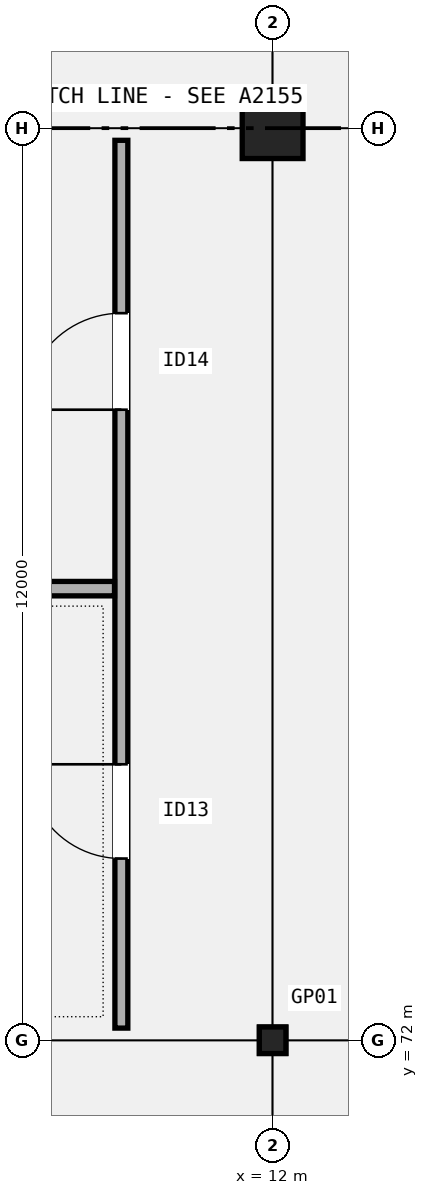
"""IFC4 building model, lengths in metres.
Left out: names, types, materials, properties, quantities, classifications, styles, units other than length and angle.
Written with IfcOpenShell. Run it as: python <this file> out.ifc"""

import sys

from ifc_helpers import new_model, si_unit, direction, frame, frame_2d, origin, origin_2d, place, context, subcontext, project, spatial, rectangle, hollow_rectangle, extrude, element, fill, save


model = new_model("IFC4")
c1 = context("Model", 3, precision=1e-05, world=origin(), true_north=direction((0.0, 1.0)))
c2 = subcontext(c1, "Body", "Model", "MODEL_VIEW")
j1 = project(units=[si_unit("LENGTHUNIT", "METRE"), si_unit("PLANEANGLEUNIT", "RADIAN")], contexts=[c1])
p1 = place(None, origin())
s1 = spatial("IfcSite", under=j1, at=p1, CompositionType="ELEMENT")
p2 = place(p1, origin())
s2 = spatial("IfcBuilding", under=s1, at=p2, CompositionType="ELEMENT")
p3 = place(p2, frame((0.0, 0.0, 15.3)))
s3 = spatial("IfcBuildingStorey", under=s2, at=p3, CompositionType="ELEMENT", Elevation=15.3)
p4 = place(p3, frame((12.0, 72.0, 0.0), z_axis=(0.0, 0.0, 1.0), x_axis=(1.0, 0.0, 0.0)))
e1 = element("IfcColumn", 1, at=p4, inside=s3, PredefinedType="COLUMN", context=c2, shape_type="SweptSolid", body=[
    extrude(hollow_rectangle(XDim=0.35, YDim=0.35, WallThickness=0.016, InnerFilletRadius=0.016, OuterFilletRadius=0.032, at=origin_2d()), origin(), (0.0, 0.0, 1.0), 5.1),
])
p5 = place(p3, frame((12.0, 84.0, 0.0), z_axis=(0.0, 0.0, 1.0), x_axis=(1.0, 0.0, 0.0)))
e2 = element("IfcColumn", 2, at=p5, inside=s3, PredefinedType="COLUMN", context=c2, shape_type="SweptSolid", body=[
    extrude(rectangle(XDim=0.8, YDim=0.8, at=origin_2d()), origin(), (0.0, 0.0, 1.0), 5.1),
])
p6 = place(p3, frame((10.01, 72.16, 0.0), z_axis=(0.0, 0.0, 1.0), x_axis=(0.0, 1.0, 0.0)))
e3 = element("IfcWall", 3, at=p6, inside=s3, PredefinedType="PARTITIONING", context=c2, shape_type="SweptSolid", body=[
    extrude(rectangle(XDim=11.68, YDim=0.17, at=frame_2d((5.84, 0.0))), origin(), (0.0, 0.0, 1.0), 4.22),
])
p7 = place(p6, frame((2.231, 0.0, 0.0)))
e4 = element("IfcOpeningElement", 4, at=p7, cuts=e3, PredefinedType="OPENING", context=c2, shape_type="SweptSolid", body=[
    extrude(rectangle(XDim=1.24, YDim=2.22, at=frame_2d((0.62, 1.11))), frame((0.0, 0.095, 0.0), z_axis=(0.0, -1.0, 0.0), x_axis=(1.0, 0.0, 0.0)), (0.0, 0.0, 1.0), 0.19),
])
p8 = place(p6, frame((8.136, 0.0, 0.0)))
e5 = element("IfcOpeningElement", 5, at=p8, cuts=e3, PredefinedType="OPENING", context=c2, shape_type="SweptSolid", body=[
    extrude(rectangle(XDim=1.27, YDim=2.2, at=frame_2d((0.635, 1.1))), frame((0.0, 0.095, 0.0), z_axis=(0.0, -1.0, 0.0), x_axis=(1.0, 0.0, 0.0)), (0.0, 0.0, 1.0), 0.19),
])
p9 = place(p3, frame((0.207, 77.942, 0.0), z_axis=(0.0, 0.0, 1.0), x_axis=(1.0, 0.0, 0.0)))
e6 = element("IfcWall", 6, at=p9, inside=s3, PredefinedType="PARTITIONING", context=c2, shape_type="SweptSolid", body=[
    extrude(rectangle(XDim=9.713, YDim=0.19, at=frame_2d((4.856, 0.0))), origin(), (0.0, 0.0, 1.0), 4.22),
])
p10 = place(p7, origin())
e7 = element("IfcDoor", 7, at=p10, inside=s3, OperationType="SINGLE_SWING_RIGHT", PredefinedType="DOOR", context=c2, shape_type="SweptSolid", body=[
    extrude(rectangle(XDim=1.24, YDim=2.22, at=frame_2d((0.62, 1.11))), frame((0.0, 0.025, 0.0), z_axis=(0.0, -1.0, 0.0), x_axis=(1.0, 0.0, 0.0)), (0.0, 0.0, 1.0), 0.05),
])
fill(e4, e7)
p11 = place(p8, origin())
e8 = element("IfcDoor", 8, at=p11, inside=s3, OperationType="SINGLE_SWING_LEFT", PredefinedType="DOOR", context=c2, shape_type="SweptSolid", body=[
    extrude(rectangle(XDim=1.27, YDim=2.2, at=frame_2d((0.635, 1.1))), frame((0.0, 0.025, 0.0), z_axis=(0.0, -1.0, 0.0), x_axis=(1.0, 0.0, 0.0)), (0.0, 0.0, 1.0), 0.05),
])
fill(e5, e8)
save(model, sys.argv[1])
